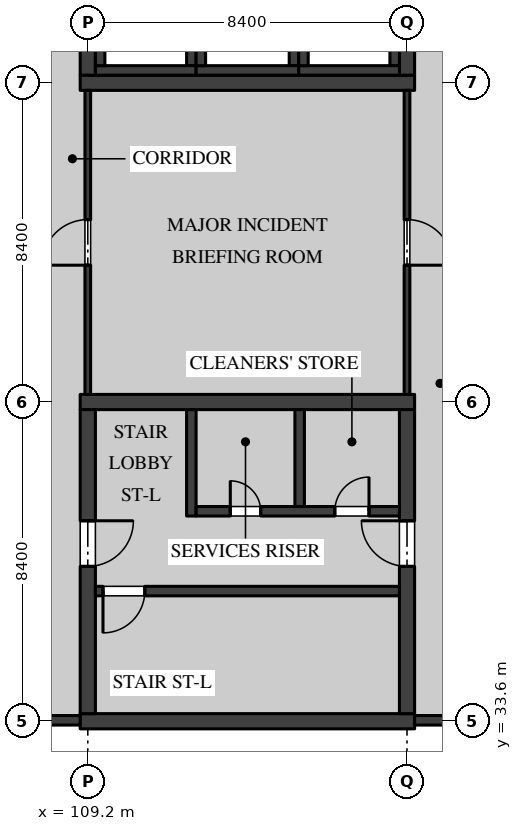
"""IFC4 building model, lengths in metres.
Left out: names, types, materials, properties, quantities, classifications, styles, units other than length and angle.
Written with IfcOpenShell. Run it as: python <this file> out.ifc"""

import sys

from ifc_helpers import new_model, si_unit, direction, frame, frame_2d, origin, place, context, subcontext, project, spatial, rectangle, extrude, element, fill, save


model = new_model("IFC4")
c1 = context("Model", 3, precision=1e-05, world=origin(), true_north=direction((0.0, 1.0)))
c2 = subcontext(c1, "Body", "Model", "MODEL_VIEW")
j1 = project(units=[si_unit("LENGTHUNIT", "METRE"), si_unit("PLANEANGLEUNIT", "RADIAN")], contexts=[c1])
p1 = place(None, origin())
s1 = spatial("IfcSite", under=j1, at=p1, CompositionType="ELEMENT")
p2 = place(p1, origin())
s2 = spatial("IfcBuilding", under=s1, at=p2, CompositionType="ELEMENT")
p3 = place(p2, frame((0.0, 0.0, 14.4)))
s3 = spatial("IfcBuildingStorey", under=s2, at=p3, CompositionType="ELEMENT", Elevation=14.4)
p4 = place(p3, frame((109.0, 50.4, 0.0), z_axis=(0.0, 0.0, 1.0), x_axis=(1.0, 0.0, 0.0)))
e1 = element("IfcWall", 1, at=p4, inside=s3, PredefinedType="SHEAR", context=c2, shape_type="SweptSolid", body=[
    extrude(rectangle(XDim=8.8, YDim=0.4, at=frame_2d((4.4, 0.0))), origin(), (0.0, 0.0, 1.0), 4.37),
])
p5 = place(p3, frame((109.2, 50.6, 0.0), z_axis=(0.0, 0.0, 1.0), x_axis=(0.0, 1.0, 0.0)))
e2 = element("IfcWall", 2, at=p5, inside=s3, PredefinedType="SHEAR", context=c2, shape_type="SweptSolid", body=[
    extrude(rectangle(XDim=8.0, YDim=0.4, at=frame_2d((4.0, 0.0))), origin(), (0.0, 0.0, 1.0), 4.37),
])
p6 = place(p5, frame((3.25, 0.0, 0.0)))
e3 = element("IfcOpeningElement", 3, at=p6, cuts=e2, PredefinedType="OPENING", context=c2, shape_type="SweptSolid", body=[
    extrude(rectangle(XDim=1.2, YDim=2.1, at=frame_2d((0.6, 1.05))), frame((0.0, 0.21, 0.0), z_axis=(0.0, -1.0, 0.0), x_axis=(1.0, 0.0, 0.0)), (0.0, 0.0, 1.0), 0.42),
])
p7 = place(p3, frame((117.6, 50.6, 0.0), z_axis=(0.0, 0.0, 1.0), x_axis=(0.0, 1.0, 0.0)))
e4 = element("IfcWall", 4, at=p7, inside=s3, PredefinedType="SHEAR", context=c2, shape_type="SweptSolid", body=[
    extrude(rectangle(XDim=8.0, YDim=0.4, at=frame_2d((4.0, 0.0))), origin(), (0.0, 0.0, 1.0), 4.37),
])
p8 = place(p7, frame((3.25, 0.0, 0.0)))
e5 = element("IfcOpeningElement", 5, at=p8, cuts=e4, PredefinedType="OPENING", context=c2, shape_type="SweptSolid", body=[
    extrude(rectangle(XDim=1.2, YDim=2.1, at=frame_2d((0.6, 1.05))), frame((0.0, 0.21, 0.0), z_axis=(0.0, -1.0, 0.0), x_axis=(1.0, 0.0, 0.0)), (0.0, 0.0, 1.0), 0.42),
])
p9 = place(p7, frame((6.0, 0.0, 0.0)))
e6 = element("IfcOpeningElement", 6, at=p9, cuts=e4, PredefinedType="OPENING", context=c2, shape_type="SweptSolid", body=[
    extrude(rectangle(XDim=1.2, YDim=2.1, at=frame_2d((0.6, 1.05))), frame((0.0, 0.21, 0.0), z_axis=(0.0, -1.0, 0.0), x_axis=(1.0, 0.0, 0.0)), (0.0, 0.0, 1.0), 0.42),
])
for number, where, z_axis, x_axis in (
    (7, (109.0, 33.6, 0.0), (0.0, 0.0, 1.0), (1.0, 0.0, 0.0)),
    (8, (109.0, 42.0, 0.0), (0.0, 0.0, 1.0), (1.0, 0.0, 0.0)),
):
    element("IfcWall", number, at=place(p3, frame(where, z_axis=z_axis, x_axis=x_axis)), inside=s3, PredefinedType="SHEAR", context=c2, shape_type="SweptSolid", body=[
        extrude(rectangle(XDim=8.8, YDim=0.4, at=frame_2d((4.4, 0.0))), origin(), (0.0, 0.0, 1.0), 4.37),
    ])
p10 = place(p3, frame((109.2, 33.8, 0.0), z_axis=(0.0, 0.0, 1.0), x_axis=(0.0, 1.0, 0.0)))
e9 = element("IfcWall", 9, at=p10, inside=s3, PredefinedType="SHEAR", context=c2, shape_type="SweptSolid", body=[
    extrude(rectangle(XDim=8.0, YDim=0.4, at=frame_2d((4.0, 0.0))), origin(), (0.0, 0.0, 1.0), 4.37),
])
p11 = place(p10, frame((3.875, 0.0, 0.0)))
e10 = element("IfcOpeningElement", 10, at=p11, cuts=e9, PredefinedType="OPENING", context=c2, shape_type="SweptSolid", body=[
    extrude(rectangle(XDim=1.2, YDim=2.1, at=frame_2d((0.6, 1.05))), frame((0.0, 0.21, 0.0), z_axis=(0.0, -1.0, 0.0), x_axis=(1.0, 0.0, 0.0)), (0.0, 0.0, 1.0), 0.42),
])
p12 = place(p3, frame((117.6, 33.8, 0.0), z_axis=(0.0, 0.0, 1.0), x_axis=(0.0, 1.0, 0.0)))
e11 = element("IfcWall", 11, at=p12, inside=s3, PredefinedType="SHEAR", context=c2, shape_type="SweptSolid", body=[
    extrude(rectangle(XDim=8.0, YDim=0.4, at=frame_2d((4.0, 0.0))), origin(), (0.0, 0.0, 1.0), 4.37),
])
p13 = place(p12, frame((3.875, 0.0, 0.0)))
e12 = element("IfcOpeningElement", 12, at=p13, cuts=e11, PredefinedType="OPENING", context=c2, shape_type="SweptSolid", body=[
    extrude(rectangle(XDim=1.2, YDim=2.1, at=frame_2d((0.6, 1.05))), frame((0.0, 0.21, 0.0), z_axis=(0.0, -1.0, 0.0), x_axis=(1.0, 0.0, 0.0)), (0.0, 0.0, 1.0), 0.42),
])
p14 = place(p3, frame((109.4, 37.025, 0.0), z_axis=(0.0, 0.0, 1.0), x_axis=(1.0, 0.0, 0.0)))
e13 = element("IfcWall", 13, at=p14, inside=s3, PredefinedType="SOLIDWALL", context=c2, shape_type="SweptSolid", body=[
    extrude(rectangle(XDim=8.0, YDim=0.25, at=frame_2d((4.0, 0.0))), origin(), (0.0, 0.0, 1.0), 4.37),
])
p15 = place(p14, frame((0.2, 0.0, 0.0)))
e14 = element("IfcOpeningElement", 14, at=p15, cuts=e13, PredefinedType="OPENING", context=c2, shape_type="SweptSolid", body=[
    extrude(rectangle(XDim=1.1, YDim=2.1, at=frame_2d((0.55, 1.05))), frame((0.0, 0.135, 0.0), z_axis=(0.0, -1.0, 0.0), x_axis=(1.0, 0.0, 0.0)), (0.0, 0.0, 1.0), 0.27),
])
p16 = place(p3, frame((111.925, 39.0, 0.0), z_axis=(0.0, 0.0, 1.0), x_axis=(0.0, 1.0, 0.0)))
e15 = element("IfcWall", 15, at=p16, inside=s3, PredefinedType="SOLIDWALL", context=c2, shape_type="SweptSolid", body=[
    extrude(rectangle(XDim=2.8, YDim=0.25, at=frame_2d((1.4, 0.0))), origin(), (0.0, 0.0, 1.0), 4.37),
])
p17 = place(p3, frame((112.05, 39.125, 0.0), z_axis=(0.0, 0.0, 1.0), x_axis=(1.0, 0.0, 0.0)))
e16 = element("IfcWall", 16, at=p17, inside=s3, PredefinedType="SOLIDWALL", context=c2, shape_type="SweptSolid", body=[
    extrude(rectangle(XDim=5.35, YDim=0.25, at=frame_2d((2.675, 0.0))), origin(), (0.0, 0.0, 1.0), 4.37),
])
p18 = place(p17, frame((3.65, 0.0, 0.0)))
e17 = element("IfcOpeningElement", 17, at=p18, cuts=e16, PredefinedType="OPENING", context=c2, shape_type="SweptSolid", body=[
    extrude(rectangle(XDim=0.9, YDim=2.1, at=frame_2d((0.45, 1.05))), frame((0.0, 0.135, 0.0), z_axis=(0.0, -1.0, 0.0), x_axis=(1.0, 0.0, 0.0)), (0.0, 0.0, 1.0), 0.27),
])
p19 = place(p17, frame((0.9, 0.0, 0.0)))
e18 = element("IfcOpeningElement", 18, at=p19, cuts=e16, PredefinedType="OPENING", context=c2, shape_type="SweptSolid", body=[
    extrude(rectangle(XDim=0.8, YDim=2.1, at=frame_2d((0.4, 1.05))), frame((0.0, 0.135, 0.0), z_axis=(0.0, -1.0, 0.0), x_axis=(1.0, 0.0, 0.0)), (0.0, 0.0, 1.0), 0.27),
])
p20 = place(p3, frame((114.775, 39.25, 0.0), z_axis=(0.0, 0.0, 1.0), x_axis=(0.0, 1.0, 0.0)))
e19 = element("IfcWall", 19, at=p20, inside=s3, PredefinedType="SOLIDWALL", context=c2, shape_type="SweptSolid", body=[
    extrude(rectangle(XDim=2.55, YDim=0.25, at=frame_2d((1.275, 0.0))), origin(), (0.0, 0.0, 1.0), 4.37),
])
p21 = place(p3, frame((111.925, 50.85, 0.0), z_axis=(0.0, 0.0, 1.0), x_axis=(0.0, 1.0, 0.0)))
e20 = element("IfcWall", 20, at=p21, inside=s3, PredefinedType="SOLIDWALL", context=c2, shape_type="SweptSolid", body=[
    extrude(rectangle(XDim=2.3, YDim=0.25, at=frame_2d((1.15, 0.0))), origin(), (0.0, 0.0, 1.0), 4.37),
])
p22 = place(p3, frame((109.4, 50.725, 0.0), z_axis=(0.0, 0.0, 1.0), x_axis=(1.0, 0.0, 0.0)))
e21 = element("IfcWall", 21, at=p22, inside=s3, PredefinedType="SOLIDWALL", context=c2, shape_type="SweptSolid", body=[
    extrude(rectangle(XDim=2.65, YDim=0.25, at=frame_2d((1.325, 0.0))), origin(), (0.0, 0.0, 1.0), 4.37),
])
for number, where, z_axis, x_axis in (
    (22, (109.525, 50.85, 0.0), (0.0, 0.0, 1.0), (0.0, 1.0, 0.0)),
    (23, (114.625, 50.85, 0.0), (0.0, 0.0, 1.0), (0.0, 1.0, 0.0)),
):
    element("IfcWall", number, at=place(p3, frame(where, z_axis=z_axis, x_axis=x_axis)), inside=s3, PredefinedType="SOLIDWALL", context=c2, shape_type="SweptSolid", body=[
        extrude(rectangle(XDim=2.3, YDim=0.25, at=frame_2d((1.15, 0.0))), origin(), (0.0, 0.0, 1.0), 4.37),
    ])
p23 = place(p3, frame((112.05, 50.725, 0.0), z_axis=(0.0, 0.0, 1.0), x_axis=(1.0, 0.0, 0.0)))
e24 = element("IfcWall", 24, at=p23, inside=s3, PredefinedType="SOLIDWALL", context=c2, shape_type="SweptSolid", body=[
    extrude(rectangle(XDim=2.7, YDim=0.25, at=frame_2d((1.35, 0.0))), origin(), (0.0, 0.0, 1.0), 4.37),
])
for number, where, z_axis, x_axis in (
    (25, (112.175, 50.85, 0.0), (0.0, 0.0, 1.0), (0.0, 1.0, 0.0)),
    (26, (117.275, 50.85, 0.0), (0.0, 0.0, 1.0), (0.0, 1.0, 0.0)),
):
    element("IfcWall", number, at=place(p3, frame(where, z_axis=z_axis, x_axis=x_axis)), inside=s3, PredefinedType="SOLIDWALL", context=c2, shape_type="SweptSolid", body=[
        extrude(rectangle(XDim=2.3, YDim=0.25, at=frame_2d((1.15, 0.0))), origin(), (0.0, 0.0, 1.0), 4.37),
    ])
p24 = place(p3, frame((114.75, 50.725, 0.0), z_axis=(0.0, 0.0, 1.0), x_axis=(1.0, 0.0, 0.0)))
e27 = element("IfcWall", 27, at=p24, inside=s3, PredefinedType="SOLIDWALL", context=c2, shape_type="SweptSolid", body=[
    extrude(rectangle(XDim=2.65, YDim=0.25, at=frame_2d((1.325, 0.0))), origin(), (0.0, 0.0, 1.0), 4.37),
])
p25 = place(p3, frame((114.875, 50.85, 0.0), z_axis=(0.0, 0.0, 1.0), x_axis=(0.0, 1.0, 0.0)))
e28 = element("IfcWall", 28, at=p25, inside=s3, PredefinedType="SOLIDWALL", context=c2, shape_type="SweptSolid", body=[
    extrude(rectangle(XDim=2.3, YDim=0.25, at=frame_2d((1.15, 0.0))), origin(), (0.0, 0.0, 1.0), 4.37),
])
p26 = place(p3, frame((117.6, 42.2, 0.0), z_axis=(0.0, 0.0, 1.0), x_axis=(0.0, 1.0, 0.0)))
e29 = element("IfcWall", 29, at=p26, inside=s3, PredefinedType="PARTITIONING", context=c2, shape_type="SweptSolid", body=[
    extrude(rectangle(XDim=8.0, YDim=0.15, at=frame_2d((4.0, 0.0))), origin(), (0.0, 0.0, 1.0), 3.746),
])
p27 = place(p26, frame((3.4, 0.0, 0.0)))
e30 = element("IfcOpeningElement", 30, at=p27, cuts=e29, PredefinedType="OPENING", context=c2, shape_type="SweptSolid", body=[
    extrude(rectangle(XDim=1.2, YDim=2.4, at=frame_2d((0.6, 1.2))), frame((0.0, 0.085, 0.0), z_axis=(0.0, -1.0, 0.0), x_axis=(1.0, 0.0, 0.0)), (0.0, 0.0, 1.0), 0.17),
])
p28 = place(p3, frame((109.2, 42.2, 0.0), z_axis=(0.0, 0.0, 1.0), x_axis=(0.0, 1.0, 0.0)))
e31 = element("IfcWall", 31, at=p28, inside=s3, PredefinedType="PARTITIONING", context=c2, shape_type="SweptSolid", body=[
    extrude(rectangle(XDim=8.0, YDim=0.15, at=frame_2d((4.0, 0.0))), origin(), (0.0, 0.0, 1.0), 3.746),
])
p29 = place(p28, frame((3.4, 0.0, 0.0)))
e32 = element("IfcOpeningElement", 32, at=p29, cuts=e31, PredefinedType="OPENING", context=c2, shape_type="SweptSolid", body=[
    extrude(rectangle(XDim=1.2, YDim=2.4, at=frame_2d((0.6, 1.2))), frame((0.0, 0.085, 0.0), z_axis=(0.0, -1.0, 0.0), x_axis=(1.0, 0.0, 0.0)), (0.0, 0.0, 1.0), 0.17),
])
p30 = place(p3, frame((100.802, 33.625, 0.0), z_axis=(0.0, 0.0, 1.0), x_axis=(1.0, 0.0, 0.0)))
e33 = element("IfcWall", 33, at=p30, inside=s3, PredefinedType="SOLIDWALL", context=c2, shape_type="SweptSolid", body=[
    extrude(rectangle(XDim=8.198, YDim=0.25, at=frame_2d((4.099, 0.0))), origin(), (0.0, 0.0, 1.0), 3.746),
])
p31 = place(p30, frame((0.898, 0.0, 0.9)))
e34 = element("IfcOpeningElement", 34, at=p31, cuts=e33, PredefinedType="OPENING", context=c2, shape_type="SweptSolid", body=[
    extrude(rectangle(XDim=2.4, YDim=2.1, at=frame_2d((1.2, 1.05))), frame((0.0, 0.135, 0.0), z_axis=(0.0, -1.0, 0.0), x_axis=(1.0, 0.0, 0.0)), (0.0, 0.0, 1.0), 0.27),
])
p32 = place(p3, frame((117.8, 33.625, 0.0), z_axis=(0.0, 0.0, 1.0), x_axis=(1.0, 0.0, 0.0)))
e35 = element("IfcWall", 35, at=p32, inside=s3, PredefinedType="SOLIDWALL", context=c2, shape_type="SweptSolid", body=[
    extrude(rectangle(XDim=8.195, YDim=0.25, at=frame_2d((4.098, 0.0))), origin(), (0.0, 0.0, 1.0), 3.746),
])
p33 = place(p32, frame((5.2, 0.0, 0.9)))
e36 = element("IfcOpeningElement", 36, at=p33, cuts=e35, PredefinedType="OPENING", context=c2, shape_type="SweptSolid", body=[
    extrude(rectangle(XDim=1.8, YDim=2.1, at=frame_2d((0.9, 1.05))), frame((0.0, 0.135, 0.0), z_axis=(0.0, -1.0, 0.0), x_axis=(1.0, 0.0, 0.0)), (0.0, 0.0, 1.0), 0.27),
])
p34 = place(p18, origin())
e37 = element("IfcDoor", 37, at=p34, inside=s3, OperationType="SINGLE_SWING_LEFT", PredefinedType="DOOR", context=c2, shape_type="SweptSolid", body=[
    extrude(rectangle(XDim=0.9, YDim=2.1, at=frame_2d((0.45, 1.05))), frame((0.0, 0.035, 0.0), z_axis=(0.0, -1.0, 0.0), x_axis=(1.0, 0.0, 0.0)), (0.0, 0.0, 1.0), 0.07),
])
fill(e17, e37)
p35 = place(p11, frame((1.2, 0.0, 0.0), z_axis=(0.0, 0.0, 1.0), x_axis=(-1.0, 0.0, 0.0)))
e38 = element("IfcDoor", 38, at=p35, inside=s3, OperationType="SINGLE_SWING_RIGHT", PredefinedType="DOOR", context=c2, shape_type="SweptSolid", body=[
    extrude(rectangle(XDim=1.2, YDim=2.1, at=frame_2d((0.6, 1.05))), frame((0.0, 0.035, 0.0), z_axis=(0.0, -1.0, 0.0), x_axis=(1.0, 0.0, 0.0)), (0.0, 0.0, 1.0), 0.07),
])
fill(e10, e38)
p36 = place(p13, origin())
e39 = element("IfcDoor", 39, at=p36, inside=s3, OperationType="SINGLE_SWING_LEFT", PredefinedType="DOOR", context=c2, shape_type="SweptSolid", body=[
    extrude(rectangle(XDim=1.2, YDim=2.1, at=frame_2d((0.6, 1.05))), frame((0.0, 0.035, 0.0), z_axis=(0.0, -1.0, 0.0), x_axis=(1.0, 0.0, 0.0)), (0.0, 0.0, 1.0), 0.07),
])
fill(e12, e39)
p37 = place(p19, origin())
e40 = element("IfcDoor", 40, at=p37, inside=s3, OperationType="SINGLE_SWING_RIGHT", PredefinedType="DOOR", context=c2, shape_type="SweptSolid", body=[
    extrude(rectangle(XDim=0.8, YDim=2.1, at=frame_2d((0.4, 1.05))), frame((0.0, 0.035, 0.0), z_axis=(0.0, -1.0, 0.0), x_axis=(1.0, 0.0, 0.0)), (0.0, 0.0, 1.0), 0.07),
])
fill(e18, e40)
p38 = place(p15, frame((1.1, 0.0, 0.0), z_axis=(0.0, 0.0, 1.0), x_axis=(-1.0, 0.0, 0.0)))
e41 = element("IfcDoor", 41, at=p38, inside=s3, OperationType="SINGLE_SWING_LEFT", PredefinedType="DOOR", context=c2, shape_type="SweptSolid", body=[
    extrude(rectangle(XDim=1.1, YDim=2.1, at=frame_2d((0.55, 1.05))), frame((0.0, 0.035, 0.0), z_axis=(0.0, -1.0, 0.0), x_axis=(1.0, 0.0, 0.0)), (0.0, 0.0, 1.0), 0.07),
])
fill(e14, e41)
p39 = place(p27, frame((1.2, 0.0, 0.0), z_axis=(0.0, 0.0, 1.0), x_axis=(-1.0, 0.0, 0.0)))
e42 = element("IfcDoor", 42, at=p39, inside=s3, OperationType="SINGLE_SWING_LEFT", PredefinedType="DOOR", context=c2, shape_type="SweptSolid", body=[
    extrude(rectangle(XDim=1.2, YDim=2.4, at=frame_2d((0.6, 1.2))), frame((0.0, 0.025, 0.0), z_axis=(0.0, -1.0, 0.0), x_axis=(1.0, 0.0, 0.0)), (0.0, 0.0, 1.0), 0.05),
])
fill(e30, e42)
p40 = place(p29, origin())
e43 = element("IfcDoor", 43, at=p40, inside=s3, OperationType="SINGLE_SWING_RIGHT", PredefinedType="DOOR", context=c2, shape_type="SweptSolid", body=[
    extrude(rectangle(XDim=1.2, YDim=2.4, at=frame_2d((0.6, 1.2))), frame((0.0, 0.025, 0.0), z_axis=(0.0, -1.0, 0.0), x_axis=(1.0, 0.0, 0.0)), (0.0, 0.0, 1.0), 0.05),
])
fill(e32, e43)
save(model, sys.argv[1])
